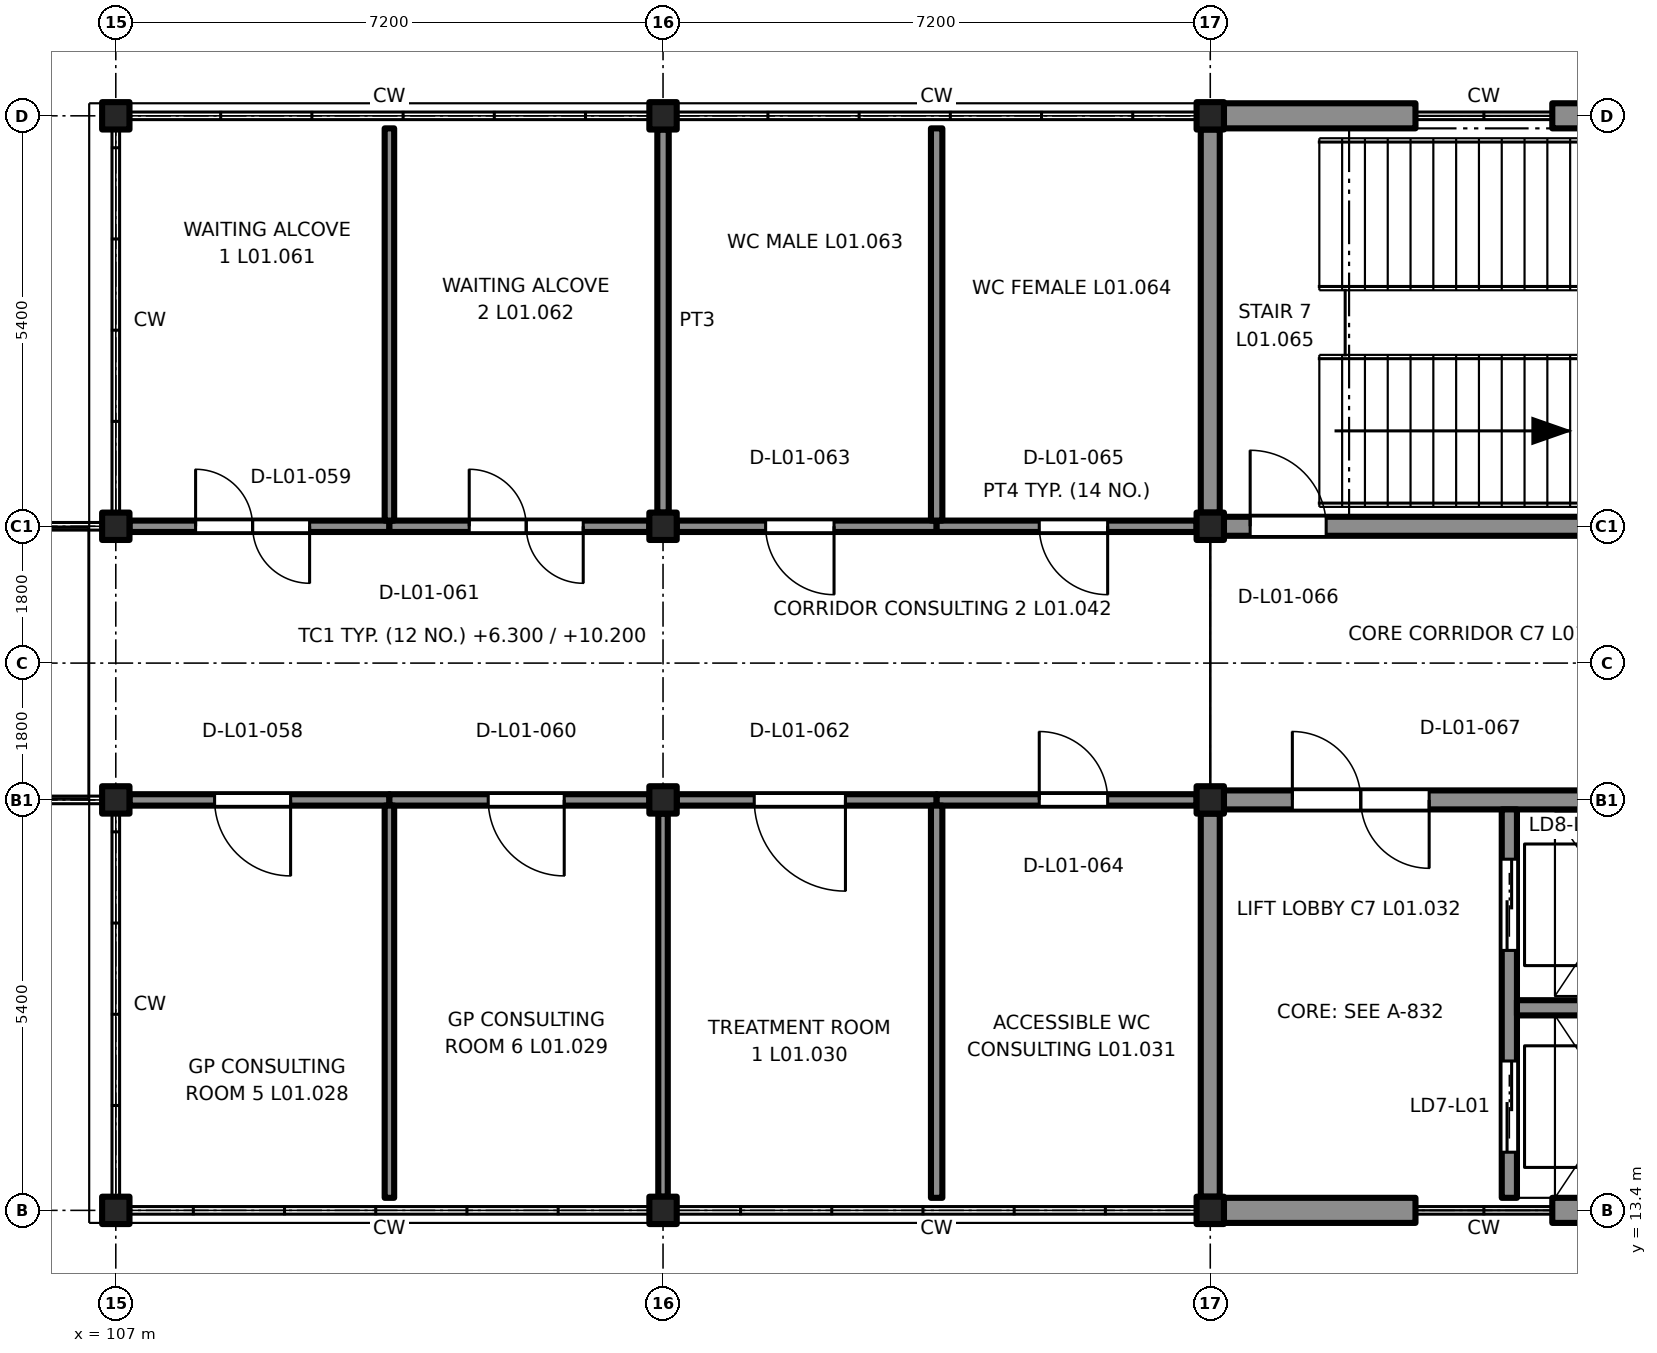
"""IFC4 building model, lengths in metres.
Left out: names, types, materials, properties, quantities, classifications, styles, units other than length and angle.
Written with IfcOpenShell. Run it as: python <this file> out.ifc"""

import sys

from ifc_helpers import new_model, si_unit, direction, frame, frame_2d, origin, origin_2d, place, context, subcontext, project, spatial, rectangle, extrude, element, fill, save


model = new_model("IFC4")
c1 = context("Model", 3, precision=1e-05, world=origin(), true_north=direction((0.0, 1.0)))
c2 = subcontext(c1, "Body", "Model", "MODEL_VIEW")
j1 = project(units=[si_unit("LENGTHUNIT", "METRE"), si_unit("PLANEANGLEUNIT", "RADIAN")], contexts=[c1])
p1 = place(None, origin())
s1 = spatial("IfcSite", under=j1, at=p1, CompositionType="ELEMENT")
p2 = place(p1, origin())
s2 = spatial("IfcBuilding", under=s1, at=p2, CompositionType="ELEMENT")
p3 = place(p2, frame((0.0, 0.0, 6.3)))
s3 = spatial("IfcBuildingStorey", under=s2, at=p3, CompositionType="ELEMENT", Elevation=6.3)
for number, where, z_axis, x_axis in (
    (1, (107.0, 13.4, 0.0), (0.0, 0.0, 1.0), (1.0, 0.0, 0.0)),
    (2, (107.0, 18.8, 0.0), (0.0, 0.0, 1.0), (1.0, 0.0, 0.0)),
    (3, (107.0, 22.4, 0.0), (0.0, 0.0, 1.0), (1.0, 0.0, 0.0)),
    (4, (107.0, 27.8, 0.0), (0.0, 0.0, 1.0), (1.0, 0.0, 0.0)),
    (5, (114.2, 13.4, 0.0), (0.0, 0.0, 1.0), (1.0, 0.0, 0.0)),
    (6, (114.2, 18.8, 0.0), (0.0, 0.0, 1.0), (1.0, 0.0, 0.0)),
    (7, (114.2, 22.4, 0.0), (0.0, 0.0, 1.0), (1.0, 0.0, 0.0)),
    (8, (114.2, 27.8, 0.0), (0.0, 0.0, 1.0), (1.0, 0.0, 0.0)),
    (9, (121.4, 13.4, 0.0), (0.0, 0.0, 1.0), (1.0, 0.0, 0.0)),
    (10, (121.4, 18.8, 0.0), (0.0, 0.0, 1.0), (1.0, 0.0, 0.0)),
    (11, (121.4, 22.4, 0.0), (0.0, 0.0, 1.0), (1.0, 0.0, 0.0)),
    (12, (121.4, 27.8, 0.0), (0.0, 0.0, 1.0), (1.0, 0.0, 0.0)),
):
    element("IfcColumn", number, at=place(p3, frame(where, z_axis=z_axis, x_axis=x_axis)), inside=s3, PredefinedType="COLUMN", context=c2, shape_type="SweptSolid", body=[
        extrude(rectangle(XDim=0.36, YDim=0.36, at=origin_2d()), origin(), (0.0, 0.0, 1.0), 3.9),
    ])
p4 = place(p3, frame((121.58, 22.4, 0.0), z_axis=(0.0, 0.0, 1.0), x_axis=(1.0, 0.0, 0.0)))
e13 = element("IfcWall", 13, at=p4, inside=s3, PredefinedType="SHEAR", context=c2, shape_type="SweptSolid", body=[
    extrude(rectangle(XDim=6.855, YDim=0.25, at=frame_2d((3.427, 0.0))), origin(), (0.0, 0.0, 1.0), 3.65),
])
p5 = place(p4, frame((0.345, 0.0, 0.0)))
e14 = element("IfcOpeningElement", 14, at=p5, cuts=e13, PredefinedType="OPENING", context=c2, shape_type="SweptSolid", body=[
    extrude(rectangle(XDim=1.0, YDim=2.1, at=frame_2d((0.5, 1.05))), frame((0.0, 0.135, 0.0), z_axis=(0.0, -1.0, 0.0), x_axis=(1.0, 0.0, 0.0)), (0.0, 0.0, 1.0), 0.27),
])
p6 = place(p3, frame((121.4, 22.58, 0.0), z_axis=(0.0, 0.0, 1.0), x_axis=(0.0, 1.0, 0.0)))
e15 = element("IfcWall", 15, at=p6, inside=s3, PredefinedType="SHEAR", context=c2, shape_type="SweptSolid", body=[
    extrude(rectangle(XDim=5.04, YDim=0.25, at=frame_2d((2.52, 0.0))), origin(), (0.0, 0.0, 1.0), 3.65),
])
p7 = place(p3, frame((121.58, 18.8, 0.0), z_axis=(0.0, 0.0, 1.0), x_axis=(1.0, 0.0, 0.0)))
e16 = element("IfcWall", 16, at=p7, inside=s3, PredefinedType="SHEAR", context=c2, shape_type="SweptSolid", body=[
    extrude(rectangle(XDim=6.855, YDim=0.25, at=frame_2d((3.427, 0.0))), origin(), (0.0, 0.0, 1.0), 3.65),
])
p8 = place(p7, frame((0.9, 0.0, 0.0)))
e17 = element("IfcOpeningElement", 17, at=p8, cuts=e16, PredefinedType="OPENING", context=c2, shape_type="SweptSolid", body=[
    extrude(rectangle(XDim=1.8, YDim=2.1, at=frame_2d((0.9, 1.05))), frame((0.0, 0.135, 0.0), z_axis=(0.0, -1.0, 0.0), x_axis=(1.0, 0.0, 0.0)), (0.0, 0.0, 1.0), 0.27),
])
p9 = place(p3, frame((121.4, 13.58, 0.0), z_axis=(0.0, 0.0, 1.0), x_axis=(0.0, 1.0, 0.0)))
e18 = element("IfcWall", 18, at=p9, inside=s3, PredefinedType="SHEAR", context=c2, shape_type="SweptSolid", body=[
    extrude(rectangle(XDim=5.04, YDim=0.25, at=frame_2d((2.52, 0.0))), origin(), (0.0, 0.0, 1.0), 3.65),
])
p10 = place(p3, frame((125.335, 13.565, 0.0), z_axis=(0.0, 0.0, 1.0), x_axis=(0.0, 1.0, 0.0)))
e19 = element("IfcWall", 19, at=p10, inside=s3, PredefinedType="SHEAR", context=c2, shape_type="SweptSolid", body=[
    extrude(rectangle(XDim=5.11, YDim=0.2, at=frame_2d((2.555, 0.0))), origin(), (0.0, 0.0, 1.0), 3.65),
])
p11 = place(p10, frame((0.6, 0.0, 0.0)))
e20 = element("IfcOpeningElement", 20, at=p11, cuts=e19, PredefinedType="OPENING", context=c2, shape_type="SweptSolid", body=[
    extrude(rectangle(XDim=1.2, YDim=2.1, at=frame_2d((0.6, 1.05))), frame((0.0, 0.11, 0.0), z_axis=(0.0, -1.0, 0.0), x_axis=(1.0, 0.0, 0.0)), (0.0, 0.0, 1.0), 0.22),
])
p12 = place(p10, frame((3.255, 0.0, 0.0)))
e21 = element("IfcOpeningElement", 21, at=p12, cuts=e19, PredefinedType="OPENING", context=c2, shape_type="SweptSolid", body=[
    extrude(rectangle(XDim=1.2, YDim=2.1, at=frame_2d((0.6, 1.05))), frame((0.0, 0.11, 0.0), z_axis=(0.0, -1.0, 0.0), x_axis=(1.0, 0.0, 0.0)), (0.0, 0.0, 1.0), 0.22),
])
p13 = place(p3, frame((128.435, 16.065, 0.0), z_axis=(0.0, 0.0, 1.0), x_axis=(-1.0, 0.0, 0.0)))
e22 = element("IfcWall", 22, at=p13, inside=s3, PredefinedType="SHEAR", context=c2, shape_type="SweptSolid", body=[
    extrude(rectangle(XDim=3.0, YDim=0.2, at=frame_2d((1.5, 0.0))), origin(), (0.0, 0.0, 1.0), 3.65),
])
p14 = place(p3, frame((124.1, 13.4, 0.0), z_axis=(0.0, 0.0, 1.0), x_axis=(-1.0, 0.0, 0.0)))
e23 = element("IfcWall", 23, at=p14, inside=s3, PredefinedType="SOLIDWALL", context=c2, shape_type="SweptSolid", body=[
    extrude(rectangle(XDim=2.52, YDim=0.33, at=frame_2d((1.26, 0.0))), origin(), (0.0, 0.0, 1.0), 3.22),
])
p15 = place(p3, frame((128.765, 13.4, 0.0), z_axis=(0.0, 0.0, 1.0), x_axis=(-1.0, 0.0, 0.0)))
e24 = element("IfcWall", 24, at=p15, inside=s3, PredefinedType="SOLIDWALL", context=c2, shape_type="SweptSolid", body=[
    extrude(rectangle(XDim=2.865, YDim=0.33, at=frame_2d((1.433, 0.0))), origin(), (0.0, 0.0, 1.0), 3.22),
])
p16 = place(p3, frame((121.58, 27.8, 0.0), z_axis=(0.0, 0.0, 1.0), x_axis=(1.0, 0.0, 0.0)))
e25 = element("IfcWall", 25, at=p16, inside=s3, PredefinedType="SOLIDWALL", context=c2, shape_type="SweptSolid", body=[
    extrude(rectangle(XDim=2.52, YDim=0.33, at=frame_2d((1.26, 0.0))), origin(), (0.0, 0.0, 1.0), 3.22),
])
p17 = place(p3, frame((125.9, 27.8, 0.0), z_axis=(0.0, 0.0, 1.0), x_axis=(1.0, 0.0, 0.0)))
e26 = element("IfcWall", 26, at=p17, inside=s3, PredefinedType="SOLIDWALL", context=c2, shape_type="SweptSolid", body=[
    extrude(rectangle(XDim=2.865, YDim=0.33, at=frame_2d((1.433, 0.0))), origin(), (0.0, 0.0, 1.0), 3.22),
])
p18 = place(p3, frame((110.6, 18.8, 0.0), z_axis=(0.0, 0.0, 1.0), x_axis=(-1.0, 0.0, 0.0)))
e27 = element("IfcWall", 27, at=p18, inside=s3, PredefinedType="PARTITIONING", context=c2, shape_type="SweptSolid", body=[
    extrude(rectangle(XDim=3.42, YDim=0.15, at=frame_2d((1.71, 0.0))), origin(), (0.0, 0.0, 1.0), 3.22),
])
p19 = place(p18, frame((1.3, 0.0, 0.0)))
e28 = element("IfcOpeningElement", 28, at=p19, cuts=e27, PredefinedType="OPENING", context=c2, shape_type="SweptSolid", body=[
    extrude(rectangle(XDim=1.0, YDim=2.1, at=frame_2d((0.5, 1.05))), frame((0.0, 0.085, 0.0), z_axis=(0.0, -1.0, 0.0), x_axis=(1.0, 0.0, 0.0)), (0.0, 0.0, 1.0), 0.17),
])
p20 = place(p3, frame((114.02, 18.8, 0.0), z_axis=(0.0, 0.0, 1.0), x_axis=(-1.0, 0.0, 0.0)))
e29 = element("IfcWall", 29, at=p20, inside=s3, PredefinedType="PARTITIONING", context=c2, shape_type="SweptSolid", body=[
    extrude(rectangle(XDim=3.42, YDim=0.15, at=frame_2d((1.71, 0.0))), origin(), (0.0, 0.0, 1.0), 3.22),
])
p21 = place(p20, frame((1.12, 0.0, 0.0)))
e30 = element("IfcOpeningElement", 30, at=p21, cuts=e29, PredefinedType="OPENING", context=c2, shape_type="SweptSolid", body=[
    extrude(rectangle(XDim=1.0, YDim=2.1, at=frame_2d((0.5, 1.05))), frame((0.0, 0.085, 0.0), z_axis=(0.0, -1.0, 0.0), x_axis=(1.0, 0.0, 0.0)), (0.0, 0.0, 1.0), 0.17),
])
p22 = place(p3, frame((110.6, 13.565, 0.0), z_axis=(0.0, 0.0, 1.0), x_axis=(0.0, 1.0, 0.0)))
e31 = element("IfcWall", 31, at=p22, inside=s3, PredefinedType="PARTITIONING", context=c2, shape_type="SweptSolid", body=[
    extrude(rectangle(XDim=5.16, YDim=0.125, at=frame_2d((2.58, 0.0))), origin(), (0.0, 0.0, 1.0), 3.38),
])
p23 = place(p3, frame((117.8, 18.8, 0.0), z_axis=(0.0, 0.0, 1.0), x_axis=(-1.0, 0.0, 0.0)))
e32 = element("IfcWall", 32, at=p23, inside=s3, PredefinedType="PARTITIONING", context=c2, shape_type="SweptSolid", body=[
    extrude(rectangle(XDim=3.42, YDim=0.15, at=frame_2d((1.71, 0.0))), origin(), (0.0, 0.0, 1.0), 3.22),
])
p24 = place(p23, frame((1.2, 0.0, 0.0)))
e33 = element("IfcOpeningElement", 33, at=p24, cuts=e32, PredefinedType="OPENING", context=c2, shape_type="SweptSolid", body=[
    extrude(rectangle(XDim=1.2, YDim=2.1, at=frame_2d((0.6, 1.05))), frame((0.0, 0.085, 0.0), z_axis=(0.0, -1.0, 0.0), x_axis=(1.0, 0.0, 0.0)), (0.0, 0.0, 1.0), 0.17),
])
p25 = place(p3, frame((114.2, 13.58, 0.0), z_axis=(0.0, 0.0, 1.0), x_axis=(0.0, 1.0, 0.0)))
e34 = element("IfcWall", 34, at=p25, inside=s3, PredefinedType="PARTITIONING", context=c2, shape_type="SweptSolid", body=[
    extrude(rectangle(XDim=5.04, YDim=0.125, at=frame_2d((2.52, 0.0))), origin(), (0.0, 0.0, 1.0), 3.38),
])
p26 = place(p3, frame((117.8, 18.8, 0.0), z_axis=(0.0, 0.0, 1.0), x_axis=(1.0, 0.0, 0.0)))
e35 = element("IfcWall", 35, at=p26, inside=s3, PredefinedType="PARTITIONING", context=c2, shape_type="SweptSolid", body=[
    extrude(rectangle(XDim=3.42, YDim=0.15, at=frame_2d((1.71, 0.0))), origin(), (0.0, 0.0, 1.0), 3.22),
])
p27 = place(p26, frame((1.35, 0.0, 0.0)))
e36 = element("IfcOpeningElement", 36, at=p27, cuts=e35, PredefinedType="OPENING", context=c2, shape_type="SweptSolid", body=[
    extrude(rectangle(XDim=0.9, YDim=2.1, at=frame_2d((0.45, 1.05))), frame((0.0, 0.085, 0.0), z_axis=(0.0, -1.0, 0.0), x_axis=(1.0, 0.0, 0.0)), (0.0, 0.0, 1.0), 0.17),
])
p28 = place(p3, frame((117.8, 13.565, 0.0), z_axis=(0.0, 0.0, 1.0), x_axis=(0.0, 1.0, 0.0)))
e37 = element("IfcWall", 37, at=p28, inside=s3, PredefinedType="PARTITIONING", context=c2, shape_type="SweptSolid", body=[
    extrude(rectangle(XDim=5.16, YDim=0.15, at=frame_2d((2.58, 0.0))), origin(), (0.0, 0.0, 1.0), 3.38),
])
p29 = place(p3, frame((107.18, 22.4, 0.0), z_axis=(0.0, 0.0, 1.0), x_axis=(1.0, 0.0, 0.0)))
e38 = element("IfcWall", 38, at=p29, inside=s3, PredefinedType="PARTITIONING", context=c2, shape_type="SweptSolid", body=[
    extrude(rectangle(XDim=3.42, YDim=0.15, at=frame_2d((1.71, 0.0))), origin(), (0.0, 0.0, 1.0), 3.22),
])
p30 = place(p29, frame((0.87, 0.0, 0.0)))
e39 = element("IfcOpeningElement", 39, at=p30, cuts=e38, PredefinedType="OPENING", context=c2, shape_type="SweptSolid", body=[
    extrude(rectangle(XDim=1.5, YDim=2.1, at=frame_2d((0.75, 1.05))), frame((0.0, 0.085, 0.0), z_axis=(0.0, -1.0, 0.0), x_axis=(1.0, 0.0, 0.0)), (0.0, 0.0, 1.0), 0.17),
])
p31 = place(p3, frame((110.6, 22.4, 0.0), z_axis=(0.0, 0.0, 1.0), x_axis=(1.0, 0.0, 0.0)))
e40 = element("IfcWall", 40, at=p31, inside=s3, PredefinedType="PARTITIONING", context=c2, shape_type="SweptSolid", body=[
    extrude(rectangle(XDim=3.42, YDim=0.15, at=frame_2d((1.71, 0.0))), origin(), (0.0, 0.0, 1.0), 3.22),
])
p32 = place(p31, frame((1.05, 0.0, 0.0)))
e41 = element("IfcOpeningElement", 41, at=p32, cuts=e40, PredefinedType="OPENING", context=c2, shape_type="SweptSolid", body=[
    extrude(rectangle(XDim=1.5, YDim=2.1, at=frame_2d((0.75, 1.05))), frame((0.0, 0.085, 0.0), z_axis=(0.0, -1.0, 0.0), x_axis=(1.0, 0.0, 0.0)), (0.0, 0.0, 1.0), 0.17),
])
p33 = place(p3, frame((110.6, 27.635, 0.0), z_axis=(0.0, 0.0, 1.0), x_axis=(0.0, -1.0, 0.0)))
e42 = element("IfcWall", 42, at=p33, inside=s3, PredefinedType="PARTITIONING", context=c2, shape_type="SweptSolid", body=[
    extrude(rectangle(XDim=5.16, YDim=0.125, at=frame_2d((2.58, 0.0))), origin(), (0.0, 0.0, 1.0), 3.38),
])
p34 = place(p3, frame((117.8, 22.4, 0.0), z_axis=(0.0, 0.0, 1.0), x_axis=(-1.0, 0.0, 0.0)))
e43 = element("IfcWall", 43, at=p34, inside=s3, PredefinedType="PARTITIONING", context=c2, shape_type="SweptSolid", body=[
    extrude(rectangle(XDim=3.42, YDim=0.15, at=frame_2d((1.71, 0.0))), origin(), (0.0, 0.0, 1.0), 3.22),
])
p35 = place(p34, frame((1.35, 0.0, 0.0)))
e44 = element("IfcOpeningElement", 44, at=p35, cuts=e43, PredefinedType="OPENING", context=c2, shape_type="SweptSolid", body=[
    extrude(rectangle(XDim=0.9, YDim=2.1, at=frame_2d((0.45, 1.05))), frame((0.0, 0.085, 0.0), z_axis=(0.0, -1.0, 0.0), x_axis=(1.0, 0.0, 0.0)), (0.0, 0.0, 1.0), 0.17),
])
p36 = place(p3, frame((114.2, 27.62, 0.0), z_axis=(0.0, 0.0, 1.0), x_axis=(0.0, -1.0, 0.0)))
e45 = element("IfcWall", 45, at=p36, inside=s3, PredefinedType="PARTITIONING", context=c2, shape_type="SweptSolid", body=[
    extrude(rectangle(XDim=5.04, YDim=0.15, at=frame_2d((2.52, 0.0))), origin(), (0.0, 0.0, 1.0), 3.38),
])
p37 = place(p3, frame((121.22, 22.4, 0.0), z_axis=(0.0, 0.0, 1.0), x_axis=(-1.0, 0.0, 0.0)))
e46 = element("IfcWall", 46, at=p37, inside=s3, PredefinedType="PARTITIONING", context=c2, shape_type="SweptSolid", body=[
    extrude(rectangle(XDim=3.42, YDim=0.15, at=frame_2d((1.71, 0.0))), origin(), (0.0, 0.0, 1.0), 3.22),
])
p38 = place(p37, frame((1.17, 0.0, 0.0)))
e47 = element("IfcOpeningElement", 47, at=p38, cuts=e46, PredefinedType="OPENING", context=c2, shape_type="SweptSolid", body=[
    extrude(rectangle(XDim=0.9, YDim=2.1, at=frame_2d((0.45, 1.05))), frame((0.0, 0.085, 0.0), z_axis=(0.0, -1.0, 0.0), x_axis=(1.0, 0.0, 0.0)), (0.0, 0.0, 1.0), 0.17),
])
p39 = place(p3, frame((117.8, 27.635, 0.0), z_axis=(0.0, 0.0, 1.0), x_axis=(0.0, -1.0, 0.0)))
e48 = element("IfcWall", 48, at=p39, inside=s3, PredefinedType="PARTITIONING", context=c2, shape_type="SweptSolid", body=[
    extrude(rectangle(XDim=5.16, YDim=0.15, at=frame_2d((2.58, 0.0))), origin(), (0.0, 0.0, 1.0), 3.38),
])
p40 = place(p5, origin())
e49 = element("IfcDoor", 49, at=p40, inside=s3, OperationType="SINGLE_SWING_RIGHT", PredefinedType="DOOR", context=c2, shape_type="SweptSolid", body=[
    extrude(rectangle(XDim=1.0, YDim=2.1, at=frame_2d((0.5, 1.05))), frame((0.0, 0.025, 0.0), z_axis=(0.0, -1.0, 0.0), x_axis=(1.0, 0.0, 0.0)), (0.0, 0.0, 1.0), 0.05),
])
fill(e14, e49)
p41 = place(p8, origin())
e50 = element("IfcDoor", 50, at=p41, inside=s3, OperationType="DOUBLE_DOOR_SINGLE_SWING", PredefinedType="DOOR", context=c2, shape_type="SweptSolid", body=[
    extrude(rectangle(XDim=1.8, YDim=2.1, at=frame_2d((0.9, 1.05))), frame((0.0, 0.025, 0.0), z_axis=(0.0, -1.0, 0.0), x_axis=(1.0, 0.0, 0.0)), (0.0, 0.0, 1.0), 0.05),
])
fill(e17, e50)
p42 = place(p11, origin())
e51 = element("IfcDoor", 51, at=p42, inside=s3, OperationType="DOUBLE_DOOR_SLIDING", PredefinedType="DOOR", context=c2, shape_type="SweptSolid", body=[
    extrude(rectangle(XDim=1.2, YDim=2.1, at=frame_2d((0.6, 1.05))), frame((0.0, 0.025, 0.0), z_axis=(0.0, -1.0, 0.0), x_axis=(1.0, 0.0, 0.0)), (0.0, 0.0, 1.0), 0.05),
])
fill(e20, e51)
p43 = place(p12, origin())
e52 = element("IfcDoor", 52, at=p43, inside=s3, OperationType="DOUBLE_DOOR_SLIDING", PredefinedType="DOOR", context=c2, shape_type="SweptSolid", body=[
    extrude(rectangle(XDim=1.2, YDim=2.1, at=frame_2d((0.6, 1.05))), frame((0.0, 0.025, 0.0), z_axis=(0.0, -1.0, 0.0), x_axis=(1.0, 0.0, 0.0)), (0.0, 0.0, 1.0), 0.05),
])
fill(e21, e52)
p44 = place(p19, origin())
e53 = element("IfcDoor", 53, at=p44, inside=s3, OperationType="SINGLE_SWING_RIGHT", PredefinedType="DOOR", context=c2, shape_type="SweptSolid", body=[
    extrude(rectangle(XDim=1.0, YDim=2.1, at=frame_2d((0.5, 1.05))), frame((0.0, 0.025, 0.0), z_axis=(0.0, -1.0, 0.0), x_axis=(1.0, 0.0, 0.0)), (0.0, 0.0, 1.0), 0.05),
])
fill(e28, e53)
p45 = place(p21, origin())
e54 = element("IfcDoor", 54, at=p45, inside=s3, OperationType="SINGLE_SWING_LEFT", PredefinedType="DOOR", context=c2, shape_type="SweptSolid", body=[
    extrude(rectangle(XDim=1.0, YDim=2.1, at=frame_2d((0.5, 1.05))), frame((0.0, 0.025, 0.0), z_axis=(0.0, -1.0, 0.0), x_axis=(1.0, 0.0, 0.0)), (0.0, 0.0, 1.0), 0.05),
])
fill(e30, e54)
p46 = place(p24, origin())
e55 = element("IfcDoor", 55, at=p46, inside=s3, OperationType="SINGLE_SWING_RIGHT", PredefinedType="DOOR", context=c2, shape_type="SweptSolid", body=[
    extrude(rectangle(XDim=1.2, YDim=2.1, at=frame_2d((0.6, 1.05))), frame((0.0, 0.025, 0.0), z_axis=(0.0, -1.0, 0.0), x_axis=(1.0, 0.0, 0.0)), (0.0, 0.0, 1.0), 0.05),
])
fill(e33, e55)
p47 = place(p27, origin())
e56 = element("IfcDoor", 56, at=p47, inside=s3, OperationType="SINGLE_SWING_RIGHT", PredefinedType="DOOR", context=c2, shape_type="SweptSolid", body=[
    extrude(rectangle(XDim=0.9, YDim=2.1, at=frame_2d((0.45, 1.05))), frame((0.0, 0.025, 0.0), z_axis=(0.0, -1.0, 0.0), x_axis=(1.0, 0.0, 0.0)), (0.0, 0.0, 1.0), 0.05),
])
fill(e36, e56)
p48 = place(p30, origin())
e57 = element("IfcDoor", 57, at=p48, inside=s3, OperationType="DOUBLE_DOOR_SINGLE_SWING", PredefinedType="DOOR", context=c2, shape_type="SweptSolid", body=[
    extrude(rectangle(XDim=1.5, YDim=2.1, at=frame_2d((0.75, 1.05))), frame((0.0, 0.025, 0.0), z_axis=(0.0, -1.0, 0.0), x_axis=(1.0, 0.0, 0.0)), (0.0, 0.0, 1.0), 0.05),
])
fill(e39, e57)
p49 = place(p32, origin())
e58 = element("IfcDoor", 58, at=p49, inside=s3, OperationType="DOUBLE_DOOR_SINGLE_SWING", PredefinedType="DOOR", context=c2, shape_type="SweptSolid", body=[
    extrude(rectangle(XDim=1.5, YDim=2.1, at=frame_2d((0.75, 1.05))), frame((0.0, 0.025, 0.0), z_axis=(0.0, -1.0, 0.0), x_axis=(1.0, 0.0, 0.0)), (0.0, 0.0, 1.0), 0.05),
])
fill(e41, e58)
p50 = place(p35, origin())
e59 = element("IfcDoor", 59, at=p50, inside=s3, OperationType="SINGLE_SWING_RIGHT", PredefinedType="DOOR", context=c2, shape_type="SweptSolid", body=[
    extrude(rectangle(XDim=0.9, YDim=2.1, at=frame_2d((0.45, 1.05))), frame((0.0, 0.025, 0.0), z_axis=(0.0, -1.0, 0.0), x_axis=(1.0, 0.0, 0.0)), (0.0, 0.0, 1.0), 0.05),
])
fill(e44, e59)
p51 = place(p38, origin())
e60 = element("IfcDoor", 60, at=p51, inside=s3, OperationType="SINGLE_SWING_LEFT", PredefinedType="DOOR", context=c2, shape_type="SweptSolid", body=[
    extrude(rectangle(XDim=0.9, YDim=2.1, at=frame_2d((0.45, 1.05))), frame((0.0, 0.025, 0.0), z_axis=(0.0, -1.0, 0.0), x_axis=(1.0, 0.0, 0.0)), (0.0, 0.0, 1.0), 0.05),
])
fill(e47, e60)
save(model, sys.argv[1])
